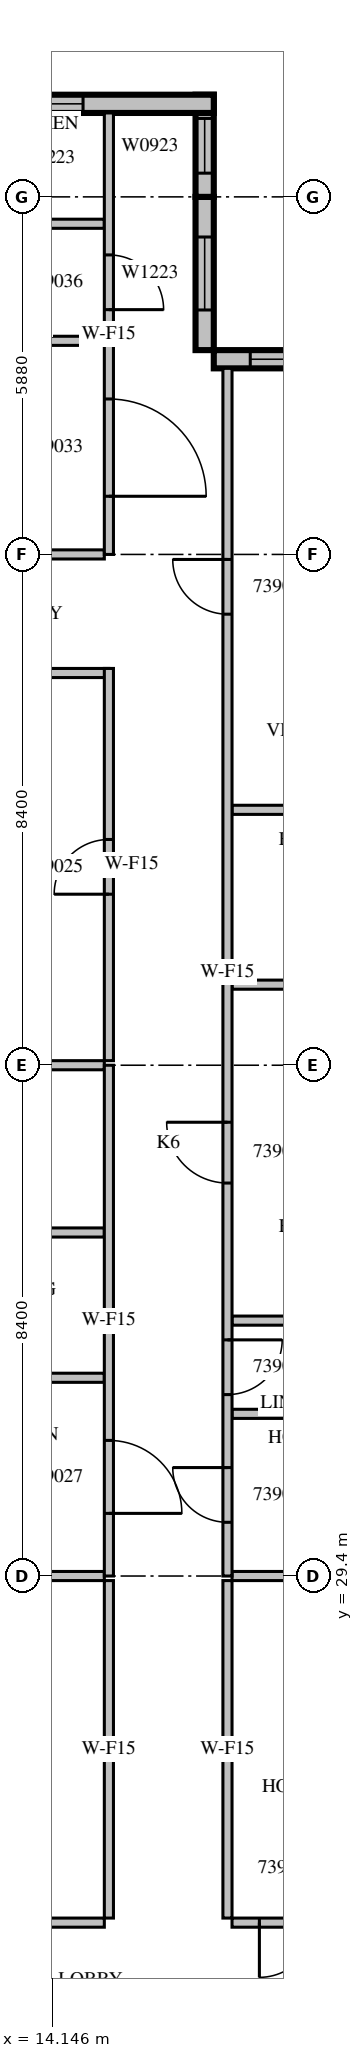
"""IFC4 building model, lengths in metres.
Left out: names, types, materials, properties, quantities, classifications, styles, units other than length and angle.
Written with IfcOpenShell. Run it as: python <this file> out.ifc"""

import sys

from ifc_helpers import new_model, si_unit, direction, frame, frame_2d, origin, place, context, subcontext, project, spatial, rectangle, extrude, source, transform, mapped, element, fill, save


model = new_model("IFC4")
c1 = context("Model", 3, precision=1e-05, world=origin(), true_north=direction((0.0, 1.0)))
c2 = subcontext(c1, "Body", "Model", "MODEL_VIEW")
j1 = project(units=[si_unit("LENGTHUNIT", "METRE"), si_unit("PLANEANGLEUNIT", "RADIAN")], contexts=[c1])
p1 = place(None, origin())
s1 = spatial("IfcSite", under=j1, at=p1, CompositionType="ELEMENT")
p2 = place(p1, origin())
s2 = spatial("IfcBuilding", under=s1, at=p2, CompositionType="ELEMENT")
p3 = place(p2, frame((0.0, 0.0, 181.6)))
s3 = spatial("IfcBuildingStorey", under=s2, at=p3, CompositionType="ELEMENT", Elevation=181.6)
m1 = source(origin(), c2, "Body", "SweptSolid", [
    extrude(rectangle(XDim=4.2, YDim=0.3, at=frame_2d((2.1, 0.0))), origin(), (0.0, 0.0, 1.0), 3.4),
])
p4 = place(p3, frame((21.0, 49.41, 0.0), z_axis=(0.0, 0.0, 1.0), x_axis=(-1.0, 0.0, 0.0)))
e1 = element("IfcWall", 1, at=p4, inside=s3, PredefinedType="STANDARD", context=c2, shape_type="MappedRepresentation", body=[
    mapped(m1, transform((0.0, 0.0, 0.0), scale=1.0)),
])
m2 = source(origin(), c2, "Body", "SweptSolid", [
    extrude(rectangle(XDim=3.0, YDim=2.3, at=frame_2d((1.5, 1.15))), frame((0.0, 0.16, 0.0), z_axis=(0.0, -1.0, 0.0), x_axis=(1.0, 0.0, 0.0)), (0.0, 0.0, 1.0), 0.32),
])
p5 = place(p4, frame((0.6, 0.0, 0.6)))
e2 = element("IfcOpeningElement", 2, at=p5, cuts=e1, PredefinedType="OPENING", context=c2, shape_type="MappedRepresentation", body=[
    mapped(m2, transform((0.0, 0.0, 0.0), scale=1.0)),
])
m3 = source(origin(), c2, "Body", "SweptSolid", [
    extrude(rectangle(XDim=2.52, YDim=0.3, at=frame_2d((1.26, 0.0))), origin(), (0.0, 0.0, 1.0), 3.4),
])
p6 = place(p3, frame((16.65, 49.56, 0.0), z_axis=(0.0, 0.0, 1.0), x_axis=(0.0, 1.0, 0.0)))
e3 = element("IfcWall", 3, at=p6, inside=s3, PredefinedType="STANDARD", context=c2, shape_type="MappedRepresentation", body=[
    mapped(m3, transform((0.0, 0.0, 0.0), scale=1.0)),
])
m4 = source(origin(), c2, "Body", "SweptSolid", [
    extrude(rectangle(XDim=1.2, YDim=2.3, at=frame_2d((0.6, 1.15))), frame((0.0, 0.16, 0.0), z_axis=(0.0, -1.0, 0.0), x_axis=(1.0, 0.0, 0.0)), (0.0, 0.0, 1.0), 0.32),
])
p7 = place(p6, frame((0.66, 0.0, 0.6)))
e4 = element("IfcOpeningElement", 4, at=p7, cuts=e3, PredefinedType="OPENING", context=c2, shape_type="MappedRepresentation", body=[
    mapped(m4, transform((0.0, 0.0, 0.0), scale=1.0)),
])
m5 = source(origin(), c2, "Body", "SweptSolid", [
    extrude(rectangle(XDim=1.68, YDim=0.3, at=frame_2d((0.84, 0.0))), origin(), (0.0, 0.0, 1.0), 3.4),
])
p8 = place(p3, frame((16.65, 52.08, 0.0), z_axis=(0.0, 0.0, 1.0), x_axis=(0.0, 1.0, 0.0)))
e5 = element("IfcWall", 5, at=p8, inside=s3, PredefinedType="STANDARD", context=c2, shape_type="MappedRepresentation", body=[
    mapped(m5, transform((0.0, 0.0, 0.0), scale=1.0)),
])
m6 = source(origin(), c2, "Body", "SweptSolid", [
    extrude(rectangle(XDim=0.9, YDim=2.3, at=frame_2d((0.45, 1.15))), frame((0.0, 0.16, 0.0), z_axis=(0.0, -1.0, 0.0), x_axis=(1.0, 0.0, 0.0)), (0.0, 0.0, 1.0), 0.32),
])
p9 = place(p8, frame((0.39, 0.0, 0.6)))
e6 = element("IfcOpeningElement", 6, at=p9, cuts=e5, PredefinedType="OPENING", context=c2, shape_type="MappedRepresentation", body=[
    mapped(m6, transform((0.0, 0.0, 0.0), scale=1.0)),
])
m7 = source(origin(), c2, "Body", "SweptSolid", [
    extrude(rectangle(XDim=10.5, YDim=0.3, at=frame_2d((5.25, 0.0))), origin(), (0.0, 0.0, 1.0), 3.4),
])
p10 = place(p3, frame((16.8, 53.61, 0.0), z_axis=(0.0, 0.0, 1.0), x_axis=(-1.0, 0.0, 0.0)))
e7 = element("IfcWall", 7, at=p10, inside=s3, PredefinedType="STANDARD", context=c2, shape_type="MappedRepresentation", body=[
    mapped(m7, transform((0.0, 0.0, 0.0), scale=1.0)),
])
p11 = place(p10, frame((2.15, 0.0, 0.6)))
e8 = element("IfcOpeningElement", 8, at=p11, cuts=e7, PredefinedType="OPENING", context=c2, shape_type="MappedRepresentation", body=[
    mapped(m4, transform((0.0, 0.0, 0.0), scale=1.0)),
])
m8 = source(origin(), c2, "Body", "SweptSolid", [
    extrude(rectangle(XDim=1.8, YDim=2.3, at=frame_2d((0.9, 1.15))), frame((0.0, 0.16, 0.0), z_axis=(0.0, -1.0, 0.0), x_axis=(1.0, 0.0, 0.0)), (0.0, 0.0, 1.0), 0.32),
])
p12 = place(p10, frame((8.025, 0.0, 0.6)))
e9 = element("IfcOpeningElement", 9, at=p12, cuts=e7, PredefinedType="OPENING", context=c2, shape_type="MappedRepresentation", body=[
    mapped(m8, transform((0.0, 0.0, 0.0), scale=1.0)),
])
m9 = source(origin(), c2, "Body", "SweptSolid", [
    extrude(rectangle(XDim=8.495, YDim=0.15, at=frame_2d((4.247, 0.0))), origin(), (0.0, 0.0, 1.0), 3.4),
])
p13 = place(p3, frame((6.505, 23.7, 0.0), z_axis=(0.0, 0.0, 1.0), x_axis=(1.0, 0.0, 0.0)))
e10 = element("IfcWall", 10, at=p13, inside=s3, PredefinedType="PARTITIONING", context=c2, shape_type="MappedRepresentation", body=[
    mapped(m9, transform((0.0, 0.0, 0.0), scale=1.0)),
])
m10 = source(origin(), c2, "Body", "SweptSolid", [
    extrude(rectangle(XDim=0.9, YDim=2.1, at=frame_2d((0.45, 1.05))), frame((0.0, 0.085, 0.0), z_axis=(0.0, -1.0, 0.0), x_axis=(1.0, 0.0, 0.0)), (0.0, 0.0, 1.0), 0.17),
])
p14 = place(p13, frame((1.395, 0.0, 0.0)))
e11 = element("IfcOpeningElement", 11, at=p14, cuts=e10, PredefinedType="OPENING", context=c2, shape_type="MappedRepresentation", body=[
    mapped(m10, transform((0.0, 0.0, 0.0), scale=1.0)),
])
p15 = place(p13, frame((6.47, 0.0, 0.0)))
e12 = element("IfcOpeningElement", 12, at=p15, cuts=e10, PredefinedType="OPENING", context=c2, shape_type="MappedRepresentation", body=[
    mapped(m10, transform((0.0, 0.0, 0.0), scale=1.0)),
])
m11 = source(origin(), c2, "Body", "SweptSolid", [
    extrude(rectangle(XDim=3.6, YDim=0.15, at=frame_2d((1.8, 0.0))), origin(), (0.0, 0.0, 1.0), 3.4),
])
p16 = place(p3, frame((17.1, 23.7, 0.0), z_axis=(0.0, 0.0, 1.0), x_axis=(1.0, 0.0, 0.0)))
e13 = element("IfcWall", 13, at=p16, inside=s3, PredefinedType="PARTITIONING", context=c2, shape_type="MappedRepresentation", body=[
    mapped(m11, transform((0.0, 0.0, 0.0), scale=1.0)),
])
p17 = place(p16, frame((0.45, 0.0, 0.0)))
e14 = element("IfcOpeningElement", 14, at=p17, cuts=e13, PredefinedType="OPENING", context=c2, shape_type="MappedRepresentation", body=[
    mapped(m10, transform((0.0, 0.0, 0.0), scale=1.0)),
])
m12 = source(origin(), c2, "Body", "SweptSolid", [
    extrude(rectangle(XDim=5.55, YDim=0.15, at=frame_2d((2.775, 0.0))), origin(), (0.0, 0.0, 1.0), 3.4),
])
for number, where, z_axis, x_axis in (
    (15, (15.075, 23.775, 0.0), (0.0, 0.0, 1.0), (0.0, 1.0, 0.0)),
    (16, (17.025, 29.325, 0.0), (0.0, 0.0, 1.0), (0.0, -1.0, 0.0)),
):
    element("IfcWall", number, at=place(p3, frame(where, z_axis=z_axis, x_axis=x_axis)), inside=s3, PredefinedType="PARTITIONING", context=c2, shape_type="MappedRepresentation", body=[
        mapped(m12, transform((0.0, 0.0, 0.0), scale=1.0)),
    ])
m13 = source(origin(), c2, "Body", "SweptSolid", [
    extrude(rectangle(XDim=4.051, YDim=0.15, at=frame_2d((2.026, 0.0))), origin(), (0.0, 0.0, 1.0), 3.4),
])
p18 = place(p3, frame((15.0, 29.4, 0.0), z_axis=(0.0, 0.0, 1.0), x_axis=(-1.0, 0.0, 0.0)))
e17 = element("IfcWall", 17, at=p18, inside=s3, PredefinedType="PARTITIONING", context=c2, shape_type="MappedRepresentation", body=[
    mapped(m13, transform((0.0, 0.0, 0.0), scale=1.0)),
])
m14 = source(origin(), c2, "Body", "SweptSolid", [
    extrude(rectangle(XDim=3.001, YDim=0.15, at=frame_2d((1.5, 0.0))), origin(), (0.0, 0.0, 1.0), 3.4),
])
p19 = place(p3, frame((20.101, 29.4, 0.0), z_axis=(0.0, 0.0, 1.0), x_axis=(-1.0, 0.0, 0.0)))
e18 = element("IfcWall", 18, at=p19, inside=s3, PredefinedType="PARTITIONING", context=c2, shape_type="MappedRepresentation", body=[
    mapped(m14, transform((0.0, 0.0, 0.0), scale=1.0)),
])
m15 = source(origin(), c2, "Body", "SweptSolid", [
    extrude(rectangle(XDim=3.575, YDim=0.15, at=frame_2d((1.788, 0.0))), origin(), (0.0, 0.0, 1.0), 3.4),
])
p20 = place(p3, frame((15.075, 44.25, 0.0), z_axis=(0.0, 0.0, 1.0), x_axis=(-1.0, 0.0, 0.0)))
e19 = element("IfcWall", 19, at=p20, inside=s3, PredefinedType="PARTITIONING", context=c2, shape_type="MappedRepresentation", body=[
    mapped(m15, transform((0.0, 0.0, 0.0), scale=1.0)),
])
m16 = source(origin(), c2, "Body", "SweptSolid", [
    extrude(rectangle(XDim=6.45, YDim=0.15, at=frame_2d((3.225, 0.0))), origin(), (0.0, 0.0, 1.0), 3.4),
])
p21 = place(p3, frame((15.075, 37.875, 0.0), z_axis=(0.0, 0.0, 1.0), x_axis=(0.0, 1.0, 0.0)))
e20 = element("IfcWall", 20, at=p21, inside=s3, PredefinedType="PARTITIONING", context=c2, shape_type="MappedRepresentation", body=[
    mapped(m16, transform((0.0, 0.0, 0.0), scale=1.0)),
])
p22 = place(p21, frame((2.737, 0.0, 0.0)))
e21 = element("IfcOpeningElement", 21, at=p22, cuts=e20, PredefinedType="OPENING", context=c2, shape_type="MappedRepresentation", body=[
    mapped(m10, transform((0.0, 0.0, 0.0), scale=1.0)),
])
m17 = source(origin(), c2, "Body", "SweptSolid", [
    extrude(rectangle(XDim=3.9, YDim=0.15, at=frame_2d((1.95, 0.0))), origin(), (0.0, 0.0, 1.0), 3.4),
])
for number, where, z_axis, x_axis in (
    (22, (15.0, 32.66, 0.0), (0.0, 0.0, 1.0), (-1.0, 0.0, 0.0)),
    (23, (15.0, 35.049, 0.0), (0.0, 0.0, 1.0), (-1.0, 0.0, 0.0)),
    (24, (15.0, 37.8, 0.0), (0.0, 0.0, 1.0), (-1.0, 0.0, 0.0)),
    (25, (15.0, 49.713, 0.0), (0.0, 0.0, 1.0), (-1.0, 0.0, 0.0)),
):
    element("IfcWall", number, at=place(p3, frame(where, z_axis=z_axis, x_axis=x_axis)), inside=s3, PredefinedType="PARTITIONING", context=c2, shape_type="MappedRepresentation", body=[
        mapped(m17, transform((0.0, 0.0, 0.0), scale=1.0)),
    ])
p23 = place(p3, frame((15.0, 51.638, 0.0), z_axis=(0.0, 0.0, 1.0), x_axis=(-1.0, 0.0, 0.0)))
e26 = element("IfcWall", 26, at=p23, inside=s3, PredefinedType="PARTITIONING", context=c2, shape_type="MappedRepresentation", body=[
    mapped(m17, transform((0.0, 0.0, 0.0), scale=1.0)),
])
p24 = place(p23, frame((1.5, 0.0, 0.0)))
e27 = element("IfcOpeningElement", 27, at=p24, cuts=e26, PredefinedType="OPENING", context=c2, shape_type="MappedRepresentation", body=[
    mapped(m10, transform((0.0, 0.0, 0.0), scale=1.0)),
])
p25 = place(p3, frame((15.0, 46.2, 0.0), z_axis=(0.0, 0.0, 1.0), x_axis=(-1.0, 0.0, 0.0)))
e28 = element("IfcWall", 28, at=p25, inside=s3, PredefinedType="PARTITIONING", context=c2, shape_type="MappedRepresentation", body=[
    mapped(m17, transform((0.0, 0.0, 0.0), scale=1.0)),
])
p26 = place(p3, frame((17.1, 32.067, 0.0), z_axis=(0.0, 0.0, 1.0), x_axis=(1.0, 0.0, 0.0)))
e29 = element("IfcWall", 29, at=p26, inside=s3, PredefinedType="PARTITIONING", context=c2, shape_type="MappedRepresentation", body=[
    mapped(m11, transform((0.0, 0.0, 0.0), scale=1.0)),
])
p27 = place(p3, frame((17.1, 39.125, 0.0), z_axis=(0.0, 0.0, 1.0), x_axis=(1.0, 0.0, 0.0)))
e30 = element("IfcWall", 30, at=p27, inside=s3, PredefinedType="PARTITIONING", context=c2, shape_type="MappedRepresentation", body=[
    mapped(m11, transform((0.0, 0.0, 0.0), scale=1.0)),
])
p28 = place(p27, frame((1.35, 0.0, 0.0)))
e31 = element("IfcOpeningElement", 31, at=p28, cuts=e30, PredefinedType="OPENING", context=c2, shape_type="MappedRepresentation", body=[
    mapped(m10, transform((0.0, 0.0, 0.0), scale=1.0)),
])
for number, where, z_axis, x_axis in (
    (32, (20.7, 33.6, 0.0), (0.0, 0.0, 1.0), (-1.0, 0.0, 0.0)),
    (33, (20.7, 42.0, 0.0), (0.0, 0.0, 1.0), (-1.0, 0.0, 0.0)),
):
    element("IfcWall", number, at=place(p3, frame(where, z_axis=z_axis, x_axis=x_axis)), inside=s3, PredefinedType="PARTITIONING", context=c2, shape_type="MappedRepresentation", body=[
        mapped(m11, transform((0.0, 0.0, 0.0), scale=1.0)),
    ])
m18 = source(origin(), c2, "Body", "SweptSolid", [
    extrude(rectangle(XDim=8.4, YDim=0.15, at=frame_2d((4.2, 0.0))), origin(), (0.0, 0.0, 1.0), 3.4),
])
p29 = place(p3, frame((15.075, 29.4, 0.0), z_axis=(0.0, 0.0, 1.0), x_axis=(0.0, 1.0, 0.0)))
e34 = element("IfcWall", 34, at=p29, inside=s3, PredefinedType="PARTITIONING", context=c2, shape_type="MappedRepresentation", body=[
    mapped(m18, transform((0.0, 0.0, 0.0), scale=1.0)),
])
m19 = source(origin(), c2, "Body", "SweptSolid", [
    extrude(rectangle(XDim=1.2, YDim=2.1, at=frame_2d((0.6, 1.05))), frame((0.0, 0.085, 0.0), z_axis=(0.0, -1.0, 0.0), x_axis=(1.0, 0.0, 0.0)), (0.0, 0.0, 1.0), 0.17),
])
p30 = place(p29, frame((1.03, 0.0, 0.0)))
e35 = element("IfcOpeningElement", 35, at=p30, cuts=e34, PredefinedType="OPENING", context=c2, shape_type="MappedRepresentation", body=[
    mapped(m19, transform((0.0, 0.0, 0.0), scale=1.0)),
])
m20 = source(origin(), c2, "Body", "SweptSolid", [
    extrude(rectangle(XDim=7.26, YDim=0.15, at=frame_2d((3.63, 0.0))), origin(), (0.0, 0.0, 1.0), 3.4),
])
p31 = place(p3, frame((15.075, 46.2, 0.0), z_axis=(0.0, 0.0, 1.0), x_axis=(0.0, 1.0, 0.0)))
e36 = element("IfcWall", 36, at=p31, inside=s3, PredefinedType="PARTITIONING", context=c2, shape_type="MappedRepresentation", body=[
    mapped(m20, transform((0.0, 0.0, 0.0), scale=1.0)),
])
m21 = source(origin(), c2, "Body", "SweptSolid", [
    extrude(rectangle(XDim=1.6, YDim=2.1, at=frame_2d((0.8, 1.05))), frame((0.0, 0.085, 0.0), z_axis=(0.0, -1.0, 0.0), x_axis=(1.0, 0.0, 0.0)), (0.0, 0.0, 1.0), 0.17),
])
p32 = place(p31, frame((0.956, 0.0, 0.0)))
e37 = element("IfcOpeningElement", 37, at=p32, cuts=e36, PredefinedType="OPENING", context=c2, shape_type="MappedRepresentation", body=[
    mapped(m21, transform((0.0, 0.0, 0.0), scale=1.0)),
])
p33 = place(p31, frame((4.025, 0.0, 0.0)))
e38 = element("IfcOpeningElement", 38, at=p33, cuts=e36, PredefinedType="OPENING", context=c2, shape_type="MappedRepresentation", body=[
    mapped(m10, transform((0.0, 0.0, 0.0), scale=1.0)),
])
m22 = source(origin(), c2, "Body", "SweptSolid", [
    extrude(rectangle(XDim=19.86, YDim=0.15, at=frame_2d((9.93, 0.0))), origin(), (0.0, 0.0, 1.0), 3.4),
])
p34 = place(p3, frame((17.025, 49.26, 0.0), z_axis=(0.0, 0.0, 1.0), x_axis=(0.0, -1.0, 0.0)))
e39 = element("IfcWall", 39, at=p34, inside=s3, PredefinedType="PARTITIONING", context=c2, shape_type="MappedRepresentation", body=[
    mapped(m22, transform((0.0, 0.0, 0.0), scale=1.0)),
])
p35 = place(p34, frame((18.076, 0.0, 0.0)))
e40 = element("IfcOpeningElement", 40, at=p35, cuts=e39, PredefinedType="OPENING", context=c2, shape_type="MappedRepresentation", body=[
    mapped(m10, transform((0.0, 0.0, 0.0), scale=1.0)),
])
p36 = place(p34, frame((15.976, 0.0, 0.0)))
e41 = element("IfcOpeningElement", 41, at=p36, cuts=e39, PredefinedType="OPENING", context=c2, shape_type="MappedRepresentation", body=[
    mapped(m10, transform((0.0, 0.0, 0.0), scale=1.0)),
])
m23 = source(origin(), c2, "Body", "SweptSolid", [
    extrude(rectangle(XDim=1.0, YDim=2.1, at=frame_2d((0.5, 1.05))), frame((0.0, 0.085, 0.0), z_axis=(0.0, -1.0, 0.0), x_axis=(1.0, 0.0, 0.0)), (0.0, 0.0, 1.0), 0.17),
])
p37 = place(p34, frame((12.398, 0.0, 0.0)))
e42 = element("IfcOpeningElement", 42, at=p37, cuts=e39, PredefinedType="OPENING", context=c2, shape_type="MappedRepresentation", body=[
    mapped(m23, transform((0.0, 0.0, 0.0), scale=1.0)),
])
p38 = place(p34, frame((3.143, 0.0, 0.0)))
e43 = element("IfcOpeningElement", 43, at=p38, cuts=e39, PredefinedType="OPENING", context=c2, shape_type="MappedRepresentation", body=[
    mapped(m10, transform((0.0, 0.0, 0.0), scale=1.0)),
])
m24 = source(origin(), c2, "Body", "SweptSolid", [
    extrude(rectangle(XDim=3.0, YDim=2.3, at=frame_2d((1.5, 1.15))), frame((0.0, 0.03, 0.0), z_axis=(0.0, -1.0, 0.0), x_axis=(1.0, 0.0, 0.0)), (0.0, 0.0, 1.0), 0.06),
])
p39 = place(p5, origin())
e44 = element("IfcWindow", 44, at=p39, inside=s3, PartitioningType="SINGLE_PANEL", PredefinedType="WINDOW", context=c2, shape_type="MappedRepresentation", body=[
    mapped(m24, transform((0.0, 0.0, 0.0), scale=1.0)),
])
fill(e2, e44)
m25 = source(origin(), c2, "Body", "SweptSolid", [
    extrude(rectangle(XDim=1.2, YDim=2.3, at=frame_2d((0.6, 1.15))), frame((0.0, 0.03, 0.0), z_axis=(0.0, -1.0, 0.0), x_axis=(1.0, 0.0, 0.0)), (0.0, 0.0, 1.0), 0.06),
])
p40 = place(p7, origin())
e45 = element("IfcWindow", 45, at=p40, inside=s3, PartitioningType="SINGLE_PANEL", PredefinedType="WINDOW", context=c2, shape_type="MappedRepresentation", body=[
    mapped(m25, transform((0.0, 0.0, 0.0), scale=1.0)),
])
fill(e4, e45)
m26 = source(origin(), c2, "Body", "SweptSolid", [
    extrude(rectangle(XDim=0.9, YDim=2.3, at=frame_2d((0.45, 1.15))), frame((0.0, 0.03, 0.0), z_axis=(0.0, -1.0, 0.0), x_axis=(1.0, 0.0, 0.0)), (0.0, 0.0, 1.0), 0.06),
])
p41 = place(p9, origin())
e46 = element("IfcWindow", 46, at=p41, inside=s3, PartitioningType="SINGLE_PANEL", PredefinedType="WINDOW", context=c2, shape_type="MappedRepresentation", body=[
    mapped(m26, transform((0.0, 0.0, 0.0), scale=1.0)),
])
fill(e6, e46)
p42 = place(p11, origin())
e47 = element("IfcWindow", 47, at=p42, inside=s3, PartitioningType="SINGLE_PANEL", PredefinedType="WINDOW", context=c2, shape_type="MappedRepresentation", body=[
    mapped(m25, transform((0.0, 0.0, 0.0), scale=1.0)),
])
fill(e8, e47)
m27 = source(origin(), c2, "Body", "SweptSolid", [
    extrude(rectangle(XDim=0.9, YDim=2.1, at=frame_2d((0.45, 1.05))), frame((0.0, 0.025, 0.0), z_axis=(0.0, -1.0, 0.0), x_axis=(1.0, 0.0, 0.0)), (0.0, 0.0, 1.0), 0.05),
])
p43 = place(p17, origin())
e48 = element("IfcDoor", 48, at=p43, inside=s3, OperationType="SINGLE_SWING_RIGHT", PredefinedType="DOOR", context=c2, shape_type="MappedRepresentation", body=[
    mapped(m27, transform((0.0, 0.0, 0.0), scale=1.0)),
])
fill(e14, e48)
p44 = place(p22, origin())
e49 = element("IfcDoor", 49, at=p44, inside=s3, OperationType="SINGLE_SWING_LEFT", PredefinedType="DOOR", context=c2, shape_type="MappedRepresentation", body=[
    mapped(m27, transform((0.0, 0.0, 0.0), scale=1.0)),
])
fill(e21, e49)
m28 = source(origin(), c2, "Body", "SweptSolid", [
    extrude(rectangle(XDim=1.2, YDim=2.1, at=frame_2d((0.6, 1.05))), frame((0.0, 0.025, 0.0), z_axis=(0.0, -1.0, 0.0), x_axis=(1.0, 0.0, 0.0)), (0.0, 0.0, 1.0), 0.05),
])
p45 = place(p30, origin())
e50 = element("IfcDoor", 50, at=p45, inside=s3, OperationType="SINGLE_SWING_RIGHT", PredefinedType="DOOR", context=c2, shape_type="MappedRepresentation", body=[
    mapped(m28, transform((0.0, 0.0, 0.0), scale=1.0)),
])
fill(e35, e50)
m29 = source(origin(), c2, "Body", "SweptSolid", [
    extrude(rectangle(XDim=1.6, YDim=2.1, at=frame_2d((0.8, 1.05))), frame((0.0, 0.025, 0.0), z_axis=(0.0, -1.0, 0.0), x_axis=(1.0, 0.0, 0.0)), (0.0, 0.0, 1.0), 0.05),
])
p46 = place(p32, origin())
e51 = element("IfcDoor", 51, at=p46, inside=s3, OperationType="SINGLE_SWING_RIGHT", PredefinedType="DOOR", context=c2, shape_type="MappedRepresentation", body=[
    mapped(m29, transform((0.0, 0.0, 0.0), scale=1.0)),
])
fill(e37, e51)
p47 = place(p33, origin())
e52 = element("IfcDoor", 52, at=p47, inside=s3, OperationType="SINGLE_SWING_RIGHT", PredefinedType="DOOR", context=c2, shape_type="MappedRepresentation", body=[
    mapped(m27, transform((0.0, 0.0, 0.0), scale=1.0)),
])
fill(e38, e52)
p48 = place(p35, origin())
e53 = element("IfcDoor", 53, at=p48, inside=s3, OperationType="SINGLE_SWING_RIGHT", PredefinedType="DOOR", context=c2, shape_type="MappedRepresentation", body=[
    mapped(m27, transform((0.0, 0.0, 0.0), scale=1.0)),
])
fill(e40, e53)
p49 = place(p36, origin())
e54 = element("IfcDoor", 54, at=p49, inside=s3, OperationType="SINGLE_SWING_LEFT", PredefinedType="DOOR", context=c2, shape_type="MappedRepresentation", body=[
    mapped(m27, transform((0.0, 0.0, 0.0), scale=1.0)),
])
fill(e41, e54)
m30 = source(origin(), c2, "Body", "SweptSolid", [
    extrude(rectangle(XDim=1.0, YDim=2.1, at=frame_2d((0.5, 1.05))), frame((0.0, 0.025, 0.0), z_axis=(0.0, -1.0, 0.0), x_axis=(1.0, 0.0, 0.0)), (0.0, 0.0, 1.0), 0.05),
])
p50 = place(p37, origin())
e55 = element("IfcDoor", 55, at=p50, inside=s3, OperationType="SINGLE_SWING_RIGHT", PredefinedType="DOOR", context=c2, shape_type="MappedRepresentation", body=[
    mapped(m30, transform((0.0, 0.0, 0.0), scale=1.0)),
])
fill(e42, e55)
p51 = place(p38, origin())
e56 = element("IfcDoor", 56, at=p51, inside=s3, OperationType="SINGLE_SWING_RIGHT", PredefinedType="DOOR", context=c2, shape_type="MappedRepresentation", body=[
    mapped(m27, transform((0.0, 0.0, 0.0), scale=1.0)),
])
fill(e43, e56)
save(model, sys.argv[1])
